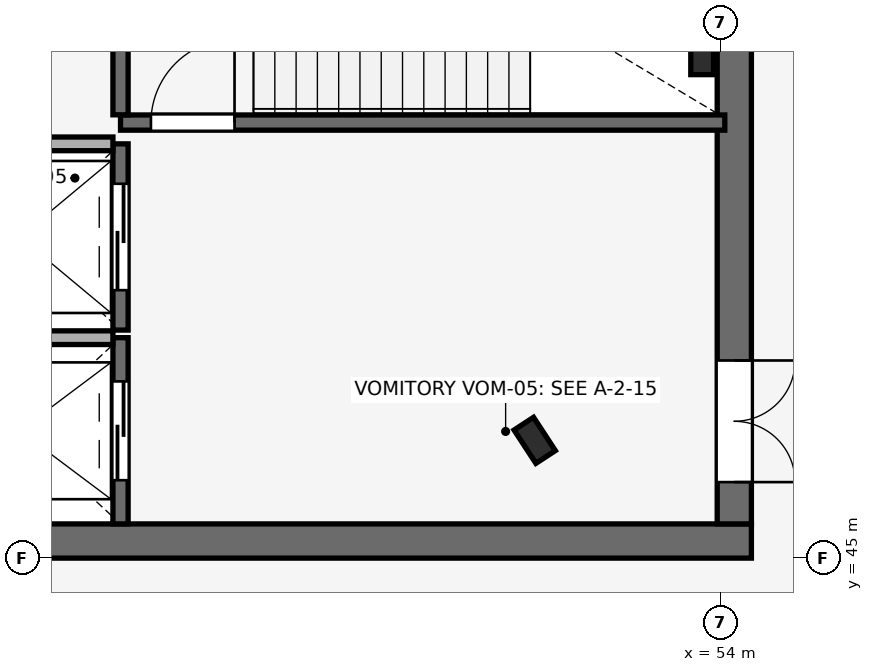
"""IFC4 building model, lengths in metres.
Left out: names, types, materials, properties, quantities, classifications, styles, units other than length and angle.
Written with IfcOpenShell. Run it as: python <this file> out.ifc"""

import sys

from ifc_helpers import new_model, si_unit, direction, frame, frame_2d, origin, origin_2d, place, context, subcontext, project, spatial, rectangle, i_section, extrude, element, fill, save


model = new_model("IFC4")
c1 = context("Model", 3, precision=1e-05, world=origin(), true_north=direction((0.0, 1.0)))
c2 = subcontext(c1, "Body", "Model", "MODEL_VIEW")
j1 = project(units=[si_unit("LENGTHUNIT", "METRE"), si_unit("PLANEANGLEUNIT", "RADIAN")], contexts=[c1])
p1 = place(None, origin())
s1 = spatial("IfcSite", under=j1, at=p1, CompositionType="ELEMENT")
p2 = place(p1, origin())
s2 = spatial("IfcBuilding", under=s1, at=p2, CompositionType="ELEMENT")
p3 = place(p2, frame((0.0, 0.0, 10.2)))
s3 = spatial("IfcBuildingStorey", under=s2, at=p3, CompositionType="ELEMENT", Elevation=10.2)
p4 = place(p3, frame((51.549, 46.55, 0.0), z_axis=(0.0, 0.0, 1.0), x_axis=(-0.836955398099, -0.547271104292, 0.0)))
e1 = element("IfcColumn", 1, at=p4, inside=s3, PredefinedType="COLUMN", context=c2, shape_type="SweptSolid", body=[
    extrude(i_section(OverallWidth=0.306, OverallDepth=0.524, WebThickness=0.021, FlangeThickness=0.04, FilletRadius=0.027, at=origin_2d()), origin(), (0.0, 0.0, 1.0), 4.8),
])
p5 = place(p3, frame((43.0, 45.225, 0.0), z_axis=(0.0, 0.0, 1.0), x_axis=(1.0, 0.0, 0.0)))
e2 = element("IfcWall", 2, at=p5, inside=s3, PredefinedType="SHEAR", context=c2, shape_type="SweptSolid", body=[
    extrude(rectangle(XDim=11.4, YDim=0.45, at=frame_2d((5.7, 0.0))), origin(), (0.0, 0.0, 1.0), 4.8),
])
p6 = place(p3, frame((54.175, 45.45, 0.0), z_axis=(0.0, 0.0, 1.0), x_axis=(0.0, 1.0, 0.0)))
e3 = element("IfcWall", 3, at=p6, inside=s3, PredefinedType="SHEAR", context=c2, shape_type="SweptSolid", body=[
    extrude(rectangle(XDim=9.1, YDim=0.45, at=frame_2d((4.55, 0.0))), origin(), (0.0, 0.0, 1.0), 4.8),
])
p7 = place(p6, frame((0.55, 0.0, 0.0)))
e4 = element("IfcOpeningElement", 4, at=p7, cuts=e3, PredefinedType="OPENING", context=c2, shape_type="SweptSolid", body=[
    extrude(rectangle(XDim=1.6, YDim=2.2, at=frame_2d((0.8, 1.1))), frame((0.0, 0.235, 0.0), z_axis=(0.0, -1.0, 0.0), x_axis=(1.0, 0.0, 0.0)), (0.0, 0.0, 1.0), 0.47),
])
p8 = place(p3, frame((53.752, 51.611, 0.0), z_axis=(0.0, 0.0, 1.0), x_axis=(1.0, 0.0, 0.0)))
e5 = element("IfcColumn", 5, at=p8, inside=s3, PredefinedType="COLUMN", context=c2, shape_type="SweptSolid", body=[
    extrude(i_section(OverallWidth=0.3, OverallDepth=0.5, WebThickness=0.014, FlangeThickness=0.028, FilletRadius=0.027, at=origin_2d()), origin(), (0.0, 0.0, 1.0), 4.8),
])
p9 = place(p3, frame((46.1, 45.45, 0.0), z_axis=(0.0, 0.0, 1.0), x_axis=(0.0, 1.0, 0.0)))
e6 = element("IfcWall", 6, at=p9, inside=s3, PredefinedType="SHEAR", context=c2, shape_type="SweptSolid", body=[
    extrude(rectangle(XDim=2.45, YDim=0.2, at=frame_2d((1.225, 0.0))), origin(), (0.0, 0.0, 1.0), 4.52),
])
p10 = place(p9, frame((0.575, 0.0, 0.0)))
e7 = element("IfcOpeningElement", 7, at=p10, cuts=e6, PredefinedType="OPENING", context=c2, shape_type="SweptSolid", body=[
    extrude(rectangle(XDim=1.3, YDim=2.2, at=frame_2d((0.65, 1.1))), frame((0.0, 0.11, 0.0), z_axis=(0.0, -1.0, 0.0), x_axis=(1.0, 0.0, 0.0)), (0.0, 0.0, 1.0), 0.22),
])
p11 = place(p3, frame((43.55, 47.9, 0.0), z_axis=(0.0, 0.0, 1.0), x_axis=(1.0, 0.0, 0.0)))
e8 = element("IfcWall", 8, at=p11, inside=s3, PredefinedType="PARTITIONING", context=c2, shape_type="SweptSolid", body=[
    extrude(rectangle(XDim=2.45, YDim=0.18, at=frame_2d((1.225, 0.0))), origin(), (0.0, 0.0, 1.0), 4.8),
])
p12 = place(p3, frame((46.1, 48.0, 0.0), z_axis=(0.0, 0.0, 1.0), x_axis=(0.0, 1.0, 0.0)))
e9 = element("IfcWall", 9, at=p12, inside=s3, PredefinedType="SHEAR", context=c2, shape_type="SweptSolid", body=[
    extrude(rectangle(XDim=2.45, YDim=0.2, at=frame_2d((1.225, 0.0))), origin(), (0.0, 0.0, 1.0), 4.52),
])
p13 = place(p12, frame((0.525, 0.0, 0.0)))
e10 = element("IfcOpeningElement", 10, at=p13, cuts=e9, PredefinedType="OPENING", context=c2, shape_type="SweptSolid", body=[
    extrude(rectangle(XDim=1.4, YDim=2.2, at=frame_2d((0.7, 1.1))), frame((0.0, 0.11, 0.0), z_axis=(0.0, -1.0, 0.0), x_axis=(1.0, 0.0, 0.0)), (0.0, 0.0, 1.0), 0.22),
])
p14 = place(p3, frame((43.55, 50.45, 0.0), z_axis=(0.0, 0.0, 1.0), x_axis=(1.0, 0.0, 0.0)))
e11 = element("IfcWall", 11, at=p14, inside=s3, PredefinedType="PARTITIONING", context=c2, shape_type="SweptSolid", body=[
    extrude(rectangle(XDim=2.45, YDim=0.18, at=frame_2d((1.225, 0.0))), origin(), (0.0, 0.0, 1.0), 4.8),
])
p15 = place(p3, frame((46.1, 50.73, 0.0), z_axis=(0.0, 0.0, 1.0), x_axis=(1.0, 0.0, 0.0)))
e12 = element("IfcWall", 12, at=p15, inside=s3, PredefinedType="SHEAR", context=c2, shape_type="SweptSolid", body=[
    extrude(rectangle(XDim=7.95, YDim=0.2, at=frame_2d((3.975, 0.0))), origin(), (0.0, 0.0, 1.0), 4.8),
])
p16 = place(p15, frame((0.4, 0.0, 0.0)))
e13 = element("IfcOpeningElement", 13, at=p16, cuts=e12, PredefinedType="OPENING", context=c2, shape_type="SweptSolid", body=[
    extrude(rectangle(XDim=1.1, YDim=2.15, at=frame_2d((0.55, 1.075))), frame((0.0, 0.11, 0.0), z_axis=(0.0, -1.0, 0.0), x_axis=(1.0, 0.0, 0.0)), (0.0, 0.0, 1.0), 0.22),
])
p17 = place(p3, frame((46.1, 50.832, 0.0), z_axis=(0.0, 0.0, 1.0), x_axis=(0.0, 1.0, 0.0)))
e14 = element("IfcWall", 14, at=p17, inside=s3, PredefinedType="SHEAR", context=c2, shape_type="SweptSolid", body=[
    extrude(rectangle(XDim=3.686, YDim=0.2, at=frame_2d((1.843, 0.0))), origin(), (0.0, 0.0, 1.0), 4.8),
])
p18 = place(p10, origin())
e15 = element("IfcDoor", 15, at=p18, inside=s3, OperationType="DOUBLE_DOOR_SLIDING", PredefinedType="DOOR", context=c2, shape_type="SweptSolid", body=[
    extrude(rectangle(XDim=1.3, YDim=2.2, at=frame_2d((0.65, 1.1))), frame((0.0, 0.025, 0.0), z_axis=(0.0, -1.0, 0.0), x_axis=(1.0, 0.0, 0.0)), (0.0, 0.0, 1.0), 0.05),
])
fill(e7, e15)
p19 = place(p13, origin())
e16 = element("IfcDoor", 16, at=p19, inside=s3, OperationType="DOUBLE_DOOR_SLIDING", PredefinedType="DOOR", context=c2, shape_type="SweptSolid", body=[
    extrude(rectangle(XDim=1.4, YDim=2.2, at=frame_2d((0.7, 1.1))), frame((0.0, 0.025, 0.0), z_axis=(0.0, -1.0, 0.0), x_axis=(1.0, 0.0, 0.0)), (0.0, 0.0, 1.0), 0.05),
])
fill(e10, e16)
p20 = place(p16, frame((1.1, 0.0, 0.0), z_axis=(0.0, 0.0, 1.0), x_axis=(-1.0, 0.0, 0.0)))
e17 = element("IfcDoor", 17, at=p20, inside=s3, OperationType="SINGLE_SWING_LEFT", PredefinedType="DOOR", context=c2, shape_type="SweptSolid", body=[
    extrude(rectangle(XDim=1.1, YDim=2.15, at=frame_2d((0.55, 1.075))), frame((0.0, 0.025, 0.0), z_axis=(0.0, -1.0, 0.0), x_axis=(1.0, 0.0, 0.0)), (0.0, 0.0, 1.0), 0.05),
])
fill(e13, e17)
p21 = place(p7, frame((1.6, 0.0, 0.0), z_axis=(0.0, 0.0, 1.0), x_axis=(-1.0, 0.0, 0.0)))
e18 = element("IfcDoor", 18, at=p21, inside=s3, OperationType="DOUBLE_DOOR_SINGLE_SWING", PredefinedType="DOOR", context=c2, shape_type="SweptSolid", body=[
    extrude(rectangle(XDim=1.6, YDim=2.2, at=frame_2d((0.8, 1.1))), frame((0.0, 0.025, 0.0), z_axis=(0.0, -1.0, 0.0), x_axis=(1.0, 0.0, 0.0)), (0.0, 0.0, 1.0), 0.05),
])
fill(e4, e18)
save(model, sys.argv[1])
